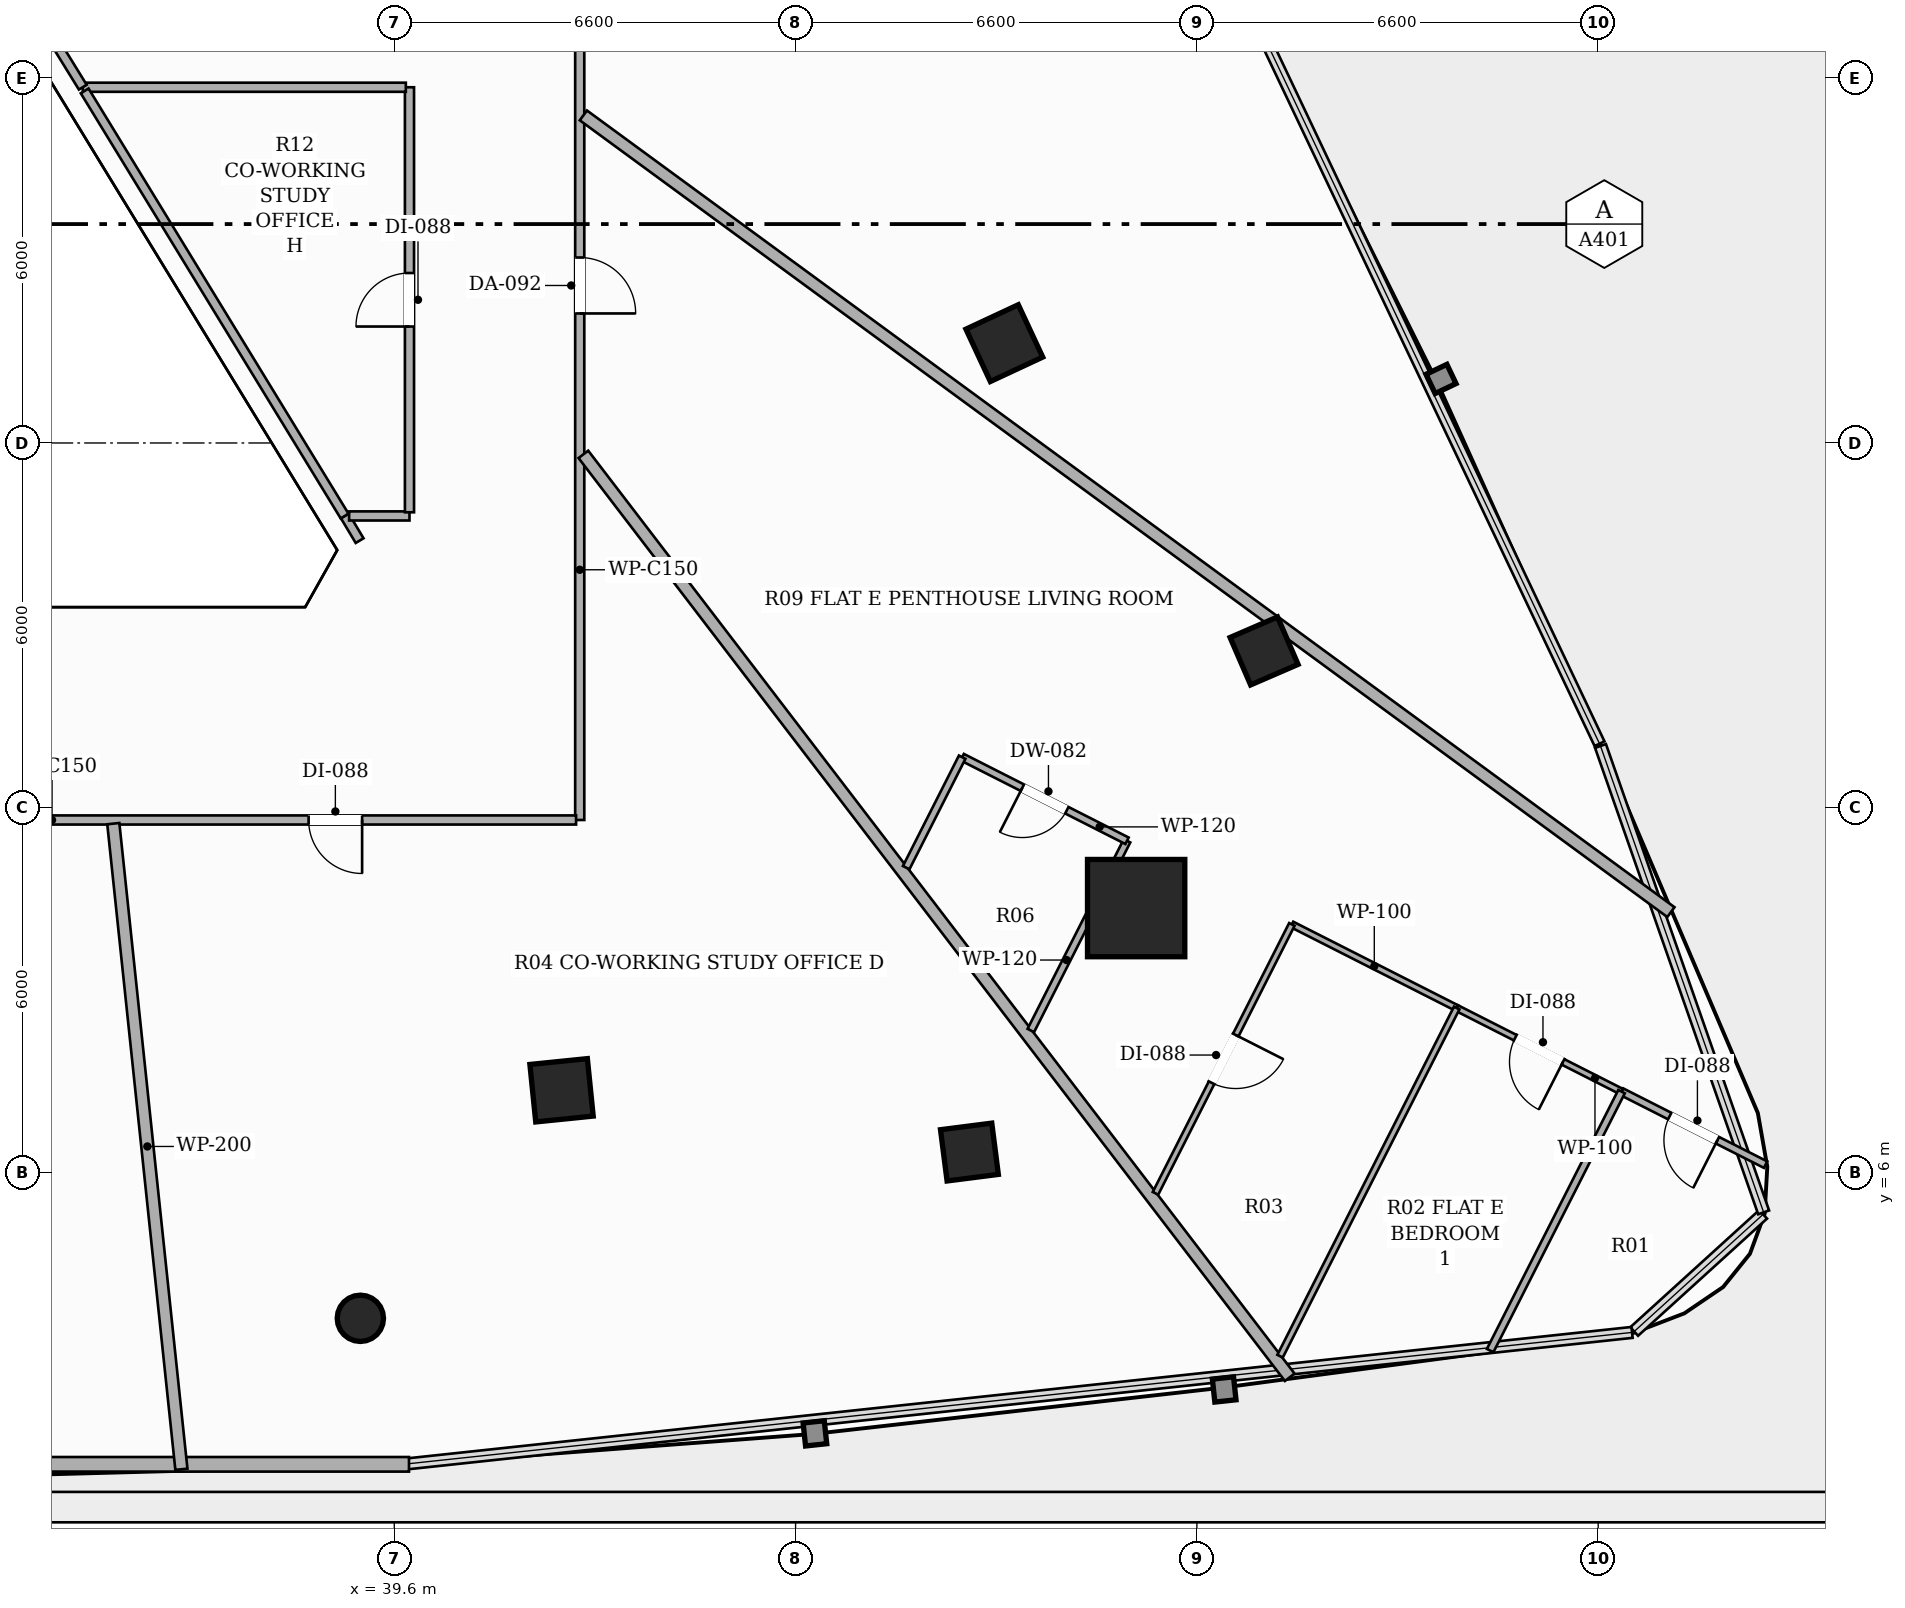
"""IFC4 building model, lengths in metres.
Left out: names, types, materials, properties, quantities, classifications, styles, units other than length and angle.
Written with IfcOpenShell. Run it as: python <this file> out.ifc"""

import sys

from ifc_helpers import new_model, si_unit, direction, frame, frame_2d, origin, origin_2d, place, context, subcontext, project, spatial, rectangle, hollow_rectangle, hollow_circle, extrude, element, fill, save


model = new_model("IFC4")
c1 = context("Model", 3, precision=1e-05, world=origin(), true_north=direction((0.0, 1.0)))
c2 = subcontext(c1, "Body", "Model", "MODEL_VIEW")
j1 = project(units=[si_unit("LENGTHUNIT", "METRE"), si_unit("PLANEANGLEUNIT", "RADIAN")], contexts=[c1])
p1 = place(None, origin())
s1 = spatial("IfcSite", under=j1, at=p1, CompositionType="ELEMENT")
p2 = place(p1, origin())
s2 = spatial("IfcBuilding", under=s1, at=p2, CompositionType="ELEMENT")
p3 = place(p2, frame((0.0, 0.0, 23.6)))
s3 = spatial("IfcBuildingStorey", under=s2, at=p3, CompositionType="ELEMENT", Elevation=23.6)
p4 = place(p3, frame((51.801, 10.351, 0.0), z_axis=(0.0, 0.0, 1.0), x_axis=(1.0, 0.0, 0.0)))
e1 = element("IfcColumn", 1, at=p4, inside=s3, PredefinedType="COLUMN", context=c2, shape_type="SweptSolid", body=[
    extrude(hollow_rectangle(XDim=1.6, YDim=1.6, WallThickness=0.05, at=origin_2d()), origin(), (0.0, 0.0, 1.0), 3.3),
])
for number, where, z_axis, x_axis in (
    (2, (42.351, 7.355, 0.0), (0.0, 0.0, 1.0), (0.995, 0.101, 0.0)),
    (3, (49.633, 19.642, 0.0), (0.0, 0.0, 1.0), (-0.423, 0.906, 0.0)),
):
    element("IfcColumn", number, at=place(p3, frame(where, z_axis=z_axis, x_axis=x_axis)), inside=s3, PredefinedType="COLUMN", context=c2, shape_type="SweptSolid", body=[
        extrude(hollow_rectangle(XDim=0.95, YDim=0.95, WallThickness=0.032, at=origin_2d()), origin(), (0.0, 0.0, 1.0), 3.3),
    ])
for number, where, z_axis, x_axis in (
    (4, (49.059, 6.339, 0.0), (0.0, 0.0, 1.0), (0.992, 0.127, 0.0)),
    (5, (53.905, 14.58, 0.0), (0.0, 0.0, 1.0), (-0.397, 0.918, 0.0)),
):
    element("IfcColumn", number, at=place(p3, frame(where, z_axis=z_axis, x_axis=x_axis)), inside=s3, PredefinedType="COLUMN", context=c2, shape_type="SweptSolid", body=[
        extrude(hollow_rectangle(XDim=0.85, YDim=0.85, WallThickness=0.028, at=origin_2d()), origin(), (0.0, 0.0, 1.0), 3.3),
    ])
p5 = place(p3, frame((39.042, 3.605, 0.0), z_axis=(0.0, 0.0, 1.0), x_axis=(1.0, 0.0, 0.0)))
e6 = element("IfcColumn", 6, at=p5, inside=s3, PredefinedType="COLUMN", context=c2, shape_type="SweptSolid", body=[
    extrude(hollow_circle(Radius=0.381, WallThickness=0.022, at=origin_2d()), origin(), (0.0, 0.0, 1.0), 3.3),
])
p6 = place(p3, frame((26.158, 1.204, 0.0), z_axis=(0.0, 0.0, 1.0), x_axis=(1.0, 0.0, 0.0)))
e7 = element("IfcWall", 7, at=p6, inside=s3, PredefinedType="SOLIDWALL", context=c2, shape_type="SweptSolid", body=[
    extrude(rectangle(XDim=13.684, YDim=0.24, at=frame_2d((6.842, 0.0))), origin(), (0.0, 0.0, 1.0), 2.624),
])
p7 = place(p6, frame((5.942, 0.0, 0.0)))
e8 = element("IfcOpeningElement", 8, at=p7, cuts=e7, PredefinedType="OPENING", context=c2, shape_type="SweptSolid", body=[
    extrude(rectangle(XDim=1.8, YDim=2.2, at=frame_2d((0.9, 1.1))), frame((0.0, 0.13, 0.0), z_axis=(0.0, -1.0, 0.0), x_axis=(1.0, 0.0, 0.0)), (0.0, 0.0, 1.0), 0.26),
])
p8 = place(p3, frame((42.65, 36.84, 0.0), z_axis=(0.0, 0.0, 1.0), x_axis=(0.0, -1.0, 0.0)))
e9 = element("IfcWall", 9, at=p8, inside=s3, PredefinedType="PARTITIONING", context=c2, shape_type="SweptSolid", body=[
    extrude(rectangle(XDim=25.04, YDim=0.15, at=frame_2d((12.52, 0.0))), origin(), (0.0, 0.0, 1.0), 2.413),
])
p9 = place(p8, frame((2.543, 0.0, 0.0)))
e10 = element("IfcOpeningElement", 10, at=p9, cuts=e9, PredefinedType="OPENING", context=c2, shape_type="SweptSolid", body=[
    extrude(rectangle(XDim=0.88, YDim=2.1, at=frame_2d((0.44, 1.05))), frame((0.0, 0.085, 0.0), z_axis=(0.0, -1.0, 0.0), x_axis=(1.0, 0.0, 0.0)), (0.0, 0.0, 1.0), 0.17),
])
p10 = place(p8, frame((15.79, 0.0, 0.0)))
e11 = element("IfcOpeningElement", 11, at=p10, cuts=e9, PredefinedType="OPENING", context=c2, shape_type="SweptSolid", body=[
    extrude(rectangle(XDim=0.92, YDim=2.15, at=frame_2d((0.46, 1.075))), frame((0.0, 0.085, 0.0), z_axis=(0.0, -1.0, 0.0), x_axis=(1.0, 0.0, 0.0)), (0.0, 0.0, 1.0), 0.17),
])
p11 = place(p8, frame((9.123, 0.0, 0.0)))
e12 = element("IfcOpeningElement", 12, at=p11, cuts=e9, PredefinedType="OPENING", context=c2, shape_type="SweptSolid", body=[
    extrude(rectangle(XDim=0.88, YDim=2.1, at=frame_2d((0.44, 1.05))), frame((0.0, 0.085, 0.0), z_axis=(0.0, -1.0, 0.0), x_axis=(1.0, 0.0, 0.0)), (0.0, 0.0, 1.0), 0.17),
])
p12 = place(p3, frame((42.59, 11.8, 0.0), z_axis=(0.0, 0.0, 1.0), x_axis=(-1.0, 0.0, 0.0)))
e13 = element("IfcWall", 13, at=p12, inside=s3, PredefinedType="PARTITIONING", context=c2, shape_type="SweptSolid", body=[
    extrude(rectangle(XDim=19.24, YDim=0.15, at=frame_2d((9.62, 0.0))), origin(), (0.0, 0.0, 1.0), 2.669),
])
p13 = place(p12, frame((12.838, 0.0, 0.0)))
e14 = element("IfcOpeningElement", 14, at=p13, cuts=e13, PredefinedType="OPENING", context=c2, shape_type="SweptSolid", body=[
    extrude(rectangle(XDim=0.88, YDim=2.1, at=frame_2d((0.44, 1.05))), frame((0.0, 0.085, 0.0), z_axis=(0.0, -1.0, 0.0), x_axis=(1.0, 0.0, 0.0)), (0.0, 0.0, 1.0), 0.17),
])
p14 = place(p12, frame((3.519, 0.0, 0.0)))
e15 = element("IfcOpeningElement", 15, at=p14, cuts=e13, PredefinedType="OPENING", context=c2, shape_type="SweptSolid", body=[
    extrude(rectangle(XDim=0.88, YDim=2.1, at=frame_2d((0.44, 1.05))), frame((0.0, 0.085, 0.0), z_axis=(0.0, -1.0, 0.0), x_axis=(1.0, 0.0, 0.0)), (0.0, 0.0, 1.0), 0.17),
])
p15 = place(p3, frame((39.03, 16.394, 0.0), z_axis=(0.0, 0.0, 1.0), x_axis=(-0.51343298076, 0.858129695482, 0.0)))
e16 = element("IfcWall", 16, at=p15, inside=s3, PredefinedType="PARTITIONING", context=c2, shape_type="SweptSolid", body=[
    extrude(rectangle(XDim=0.473, YDim=0.15, at=frame_2d((0.237, 0.0))), origin(), (0.0, 0.0, 1.0), 3.06),
])
p16 = place(p3, frame((38.857, 16.8, 0.0), z_axis=(0.0, 0.0, 1.0), x_axis=(1.0, 0.0, 0.0)))
e17 = element("IfcWall", 17, at=p16, inside=s3, PredefinedType="PARTITIONING", context=c2, shape_type="SweptSolid", body=[
    extrude(rectangle(XDim=0.993, YDim=0.15, at=frame_2d((0.497, 0.0))), origin(), (0.0, 0.0, 1.0), 3.06),
])
p17 = place(p3, frame((39.85, 16.86, 0.0), z_axis=(0.0, 0.0, 1.0), x_axis=(0.0, 1.0, 0.0)))
e18 = element("IfcWall", 18, at=p17, inside=s3, PredefinedType="PARTITIONING", context=c2, shape_type="SweptSolid", body=[
    extrude(rectangle(XDim=6.99, YDim=0.15, at=frame_2d((3.495, 0.0))), origin(), (0.0, 0.0, 1.0), 2.669),
])
p18 = place(p17, frame((3.055, 0.0, 0.0)))
e19 = element("IfcOpeningElement", 19, at=p18, cuts=e18, PredefinedType="OPENING", context=c2, shape_type="SweptSolid", body=[
    extrude(rectangle(XDim=0.88, YDim=2.1, at=frame_2d((0.44, 1.05))), frame((0.0, 0.085, 0.0), z_axis=(0.0, -1.0, 0.0), x_axis=(1.0, 0.0, 0.0)), (0.0, 0.0, 1.0), 0.17),
])
p19 = place(p3, frame((39.79, 23.85, 0.0), z_axis=(0.0, 0.0, 1.0), x_axis=(-1.0, 0.0, 0.0)))
e20 = element("IfcWall", 20, at=p19, inside=s3, PredefinedType="PARTITIONING", context=c2, shape_type="SweptSolid", body=[
    extrude(rectangle(XDim=5.313, YDim=0.15, at=frame_2d((2.656, 0.0))), origin(), (0.0, 0.0, 1.0), 2.669),
])
p20 = place(p3, frame((34.477, 23.851, 0.0), z_axis=(0.0, 0.0, 1.0), x_axis=(-0.52541513414, 0.8508460124, 0.0)))
e21 = element("IfcWall", 21, at=p20, inside=s3, PredefinedType="PARTITIONING", context=c2, shape_type="SweptSolid", body=[
    extrude(rectangle(XDim=1.136, YDim=0.15, at=frame_2d((0.568, 0.0))), origin(), (0.0, 0.0, 1.0), 3.06),
])
p21 = place(p3, frame((34.508, 23.79, 0.0), z_axis=(0.0, 0.0, 1.0), x_axis=(0.52163195406, -0.853170618636, 0.0)))
e22 = element("IfcWall", 22, at=p21, inside=s3, PredefinedType="PARTITIONING", context=c2, shape_type="SweptSolid", body=[
    extrude(rectangle(XDim=8.195, YDim=0.15, at=frame_2d((4.098, 0.0))), origin(), (0.0, 0.0, 1.0), 2.669),
])
p22 = place(p3, frame((34.979, 11.74, 0.0), z_axis=(0.0, 0.0, 1.0), x_axis=(0.104910939681, -0.994481621115, 0.0)))
e23 = element("IfcWall", 23, at=p22, inside=s3, PredefinedType="PARTITIONING", context=c2, shape_type="SweptSolid", body=[
    extrude(rectangle(XDim=10.677, YDim=0.2, at=frame_2d((5.338, 0.0))), origin(), (0.0, 0.0, 1.0), 2.413),
])
p23 = place(p3, frame((42.71, 17.813, 0.0), z_axis=(0.0, 0.0, 1.0), x_axis=(0.607788570878, -0.794098893784, 0.0)))
e24 = element("IfcWall", 24, at=p23, inside=s3, PredefinedType="PARTITIONING", context=c2, shape_type="SweptSolid", body=[
    extrude(rectangle(XDim=19.114, YDim=0.2, at=frame_2d((9.557, 0.0))), origin(), (0.0, 0.0, 1.0), 2.413),
])
p24 = place(p3, frame((42.71, 23.387, 0.0), z_axis=(0.0, 0.0, 1.0), x_axis=(0.806713303584, -0.590943014021, 0.0)))
e25 = element("IfcWall", 25, at=p24, inside=s3, PredefinedType="PARTITIONING", context=c2, shape_type="SweptSolid", body=[
    extrude(rectangle(XDim=22.171, YDim=0.2, at=frame_2d((11.086, 0.0))), origin(), (0.0, 0.0, 1.0), 2.413),
])
p25 = place(p3, frame((50.069, 8.338, 0.0), z_axis=(0.0, 0.0, 1.0), x_axis=(0.45217581214, 0.891928828391, 0.0)))
e26 = element("IfcWall", 26, at=p25, inside=s3, PredefinedType="PARTITIONING", context=c2, shape_type="SweptSolid", body=[
    extrude(rectangle(XDim=3.498, YDim=0.12, at=frame_2d((1.749, 0.0))), origin(), (0.0, 0.0, 1.0), 2.413),
])
p26 = place(p3, frame((51.651, 11.458, 0.0), z_axis=(0.0, 0.0, 1.0), x_axis=(-0.891842269509, 0.452346511336, 0.0)))
e27 = element("IfcWall", 27, at=p26, inside=s3, PredefinedType="PARTITIONING", context=c2, shape_type="SweptSolid", body=[
    extrude(rectangle(XDim=3.04, YDim=0.12, at=frame_2d((1.52, 0.0))), origin(), (0.0, 0.0, 1.0), 2.413),
])
p27 = place(p26, frame((1.11, 0.0, 0.0)))
e28 = element("IfcOpeningElement", 28, at=p27, cuts=e27, PredefinedType="OPENING", context=c2, shape_type="SweptSolid", body=[
    extrude(rectangle(XDim=0.82, YDim=2.1, at=frame_2d((0.41, 1.05))), frame((0.0, 0.07, 0.0), z_axis=(0.0, -1.0, 0.0), x_axis=(1.0, 0.0, 0.0)), (0.0, 0.0, 1.0), 0.14),
])
p28 = place(p3, frame((48.94, 12.833, 0.0), z_axis=(0.0, 0.0, 1.0), x_axis=(-0.452097038501, -0.891968759418, 0.0)))
e29 = element("IfcWall", 29, at=p28, inside=s3, PredefinedType="PARTITIONING", context=c2, shape_type="SweptSolid", body=[
    extrude(rectangle(XDim=2.037, YDim=0.12, at=frame_2d((1.019, 0.0))), origin(), (0.0, 0.0, 1.0), 3.06),
])
p29 = place(p3, frame((62.153, 6.132, 0.0), z_axis=(0.0, 0.0, 1.0), x_axis=(-0.891950280654, 0.452133494491, 0.0)))
e30 = element("IfcWall", 30, at=p29, inside=s3, PredefinedType="PARTITIONING", context=c2, shape_type="SweptSolid", body=[
    extrude(rectangle(XDim=2.656, YDim=0.12, at=frame_2d((1.328, 0.0))), origin(), (0.0, 0.0, 1.0), 3.06),
])
p30 = place(p29, frame((0.888, 0.0, 0.0)))
e31 = element("IfcOpeningElement", 31, at=p30, cuts=e30, PredefinedType="OPENING", context=c2, shape_type="SweptSolid", body=[
    extrude(rectangle(XDim=0.88, YDim=2.1, at=frame_2d((0.44, 1.05))), frame((0.0, 0.07, 0.0), z_axis=(0.0, -1.0, 0.0), x_axis=(1.0, 0.0, 0.0)), (0.0, 0.0, 1.0), 0.14),
])
p31 = place(p3, frame((59.784, 7.333, 0.0), z_axis=(0.0, 0.0, 1.0), x_axis=(-0.891842269509, 0.452346511336, 0.0)))
e32 = element("IfcWall", 32, at=p31, inside=s3, PredefinedType="PARTITIONING", context=c2, shape_type="SweptSolid", body=[
    extrude(rectangle(XDim=3.04, YDim=0.1, at=frame_2d((1.52, 0.0))), origin(), (0.0, 0.0, 1.0), 3.06),
])
p32 = place(p31, frame((1.08, 0.0, 0.0)))
e33 = element("IfcOpeningElement", 33, at=p32, cuts=e32, PredefinedType="OPENING", context=c2, shape_type="SweptSolid", body=[
    extrude(rectangle(XDim=0.88, YDim=2.1, at=frame_2d((0.44, 1.05))), frame((0.0, 0.06, 0.0), z_axis=(0.0, -1.0, 0.0), x_axis=(1.0, 0.0, 0.0)), (0.0, 0.0, 1.0), 0.12),
])
p33 = place(p3, frame((57.073, 8.708, 0.0), z_axis=(0.0, 0.0, 1.0), x_axis=(-0.891842269509, 0.452346511336, 0.0)))
e34 = element("IfcWall", 34, at=p33, inside=s3, PredefinedType="PARTITIONING", context=c2, shape_type="SweptSolid", body=[
    extrude(rectangle(XDim=3.04, YDim=0.1, at=frame_2d((1.52, 0.0))), origin(), (0.0, 0.0, 1.0), 2.619),
])
p34 = place(p3, frame((54.362, 10.083, 0.0), z_axis=(0.0, 0.0, 1.0), x_axis=(-0.452306340277, -0.891862643317, 0.0)))
e35 = element("IfcWall", 35, at=p34, inside=s3, PredefinedType="PARTITIONING", context=c2, shape_type="SweptSolid", body=[
    extrude(rectangle(XDim=4.959, YDim=0.1, at=frame_2d((2.48, 0.0))), origin(), (0.0, 0.0, 1.0), 3.06),
])
p35 = place(p34, frame((2.04, 0.0, 0.0)))
e36 = element("IfcOpeningElement", 36, at=p35, cuts=e35, PredefinedType="OPENING", context=c2, shape_type="SweptSolid", body=[
    extrude(rectangle(XDim=0.88, YDim=2.1, at=frame_2d((0.44, 1.05))), frame((0.0, 0.06, 0.0), z_axis=(0.0, -1.0, 0.0), x_axis=(1.0, 0.0, 0.0)), (0.0, 0.0, 1.0), 0.12),
])
p36 = place(p3, frame((57.623, 3.074, 0.0), z_axis=(0.0, 0.0, 1.0), x_axis=(0.452460987707, 0.891784197328, 0.0)))
e37 = element("IfcWall", 37, at=p36, inside=s3, PredefinedType="PARTITIONING", context=c2, shape_type="SweptSolid", body=[
    extrude(rectangle(XDim=4.776, YDim=0.12, at=frame_2d((2.388, 0.0))), origin(), (0.0, 0.0, 1.0), 3.06),
])
p37 = place(p3, frame((54.168, 2.982, 0.0), z_axis=(0.0, 0.0, 1.0), x_axis=(0.452437935158, 0.891795893033, 0.0)))
e38 = element("IfcWall", 38, at=p37, inside=s3, PredefinedType="PARTITIONING", context=c2, shape_type="SweptSolid", body=[
    extrude(rectangle(XDim=6.421, YDim=0.1, at=frame_2d((3.21, 0.0))), origin(), (0.0, 0.0, 1.0), 2.619),
])
p38 = place(p14, origin())
e39 = element("IfcDoor", 39, at=p38, inside=s3, OperationType="SINGLE_SWING_LEFT", PredefinedType="DOOR", context=c2, shape_type="SweptSolid", body=[
    extrude(rectangle(XDim=0.88, YDim=2.1, at=frame_2d((0.44, 1.05))), frame((0.0, 0.025, 0.0), z_axis=(0.0, -1.0, 0.0), x_axis=(1.0, 0.0, 0.0)), (0.0, 0.0, 1.0), 0.05),
])
fill(e15, e39)
p39 = place(p10, origin())
e40 = element("IfcDoor", 40, at=p39, inside=s3, OperationType="SINGLE_SWING_RIGHT", PredefinedType="DOOR", context=c2, shape_type="SweptSolid", body=[
    extrude(rectangle(XDim=0.92, YDim=2.15, at=frame_2d((0.46, 1.075))), frame((0.0, 0.025, 0.0), z_axis=(0.0, -1.0, 0.0), x_axis=(1.0, 0.0, 0.0)), (0.0, 0.0, 1.0), 0.05),
])
fill(e11, e40)
p40 = place(p27, origin())
e41 = element("IfcDoor", 41, at=p40, inside=s3, OperationType="SINGLE_SWING_RIGHT", PredefinedType="DOOR", context=c2, shape_type="SweptSolid", body=[
    extrude(rectangle(XDim=0.82, YDim=2.1, at=frame_2d((0.41, 1.05))), frame((0.0, 0.025, 0.0), z_axis=(0.0, -1.0, 0.0), x_axis=(1.0, 0.0, 0.0)), (0.0, 0.0, 1.0), 0.05),
])
fill(e28, e41)
p41 = place(p30, origin())
e42 = element("IfcDoor", 42, at=p41, inside=s3, OperationType="SINGLE_SWING_LEFT", PredefinedType="DOOR", context=c2, shape_type="SweptSolid", body=[
    extrude(rectangle(XDim=0.88, YDim=2.1, at=frame_2d((0.44, 1.05))), frame((0.0, 0.025, 0.0), z_axis=(0.0, -1.0, 0.0), x_axis=(1.0, 0.0, 0.0)), (0.0, 0.0, 1.0), 0.05),
])
fill(e31, e42)
p42 = place(p32, origin())
e43 = element("IfcDoor", 43, at=p42, inside=s3, OperationType="SINGLE_SWING_LEFT", PredefinedType="DOOR", context=c2, shape_type="SweptSolid", body=[
    extrude(rectangle(XDim=0.88, YDim=2.1, at=frame_2d((0.44, 1.05))), frame((0.0, 0.025, 0.0), z_axis=(0.0, -1.0, 0.0), x_axis=(1.0, 0.0, 0.0)), (0.0, 0.0, 1.0), 0.05),
])
fill(e33, e43)
p43 = place(p35, origin())
e44 = element("IfcDoor", 44, at=p43, inside=s3, OperationType="SINGLE_SWING_LEFT", PredefinedType="DOOR", context=c2, shape_type="SweptSolid", body=[
    extrude(rectangle(XDim=0.88, YDim=2.1, at=frame_2d((0.44, 1.05))), frame((0.0, 0.025, 0.0), z_axis=(0.0, -1.0, 0.0), x_axis=(1.0, 0.0, 0.0)), (0.0, 0.0, 1.0), 0.05),
])
fill(e36, e44)
p44 = place(p18, origin())
e45 = element("IfcDoor", 45, at=p44, inside=s3, OperationType="SINGLE_SWING_LEFT", PredefinedType="DOOR", context=c2, shape_type="SweptSolid", body=[
    extrude(rectangle(XDim=0.88, YDim=2.1, at=frame_2d((0.44, 1.05))), frame((0.0, 0.025, 0.0), z_axis=(0.0, -1.0, 0.0), x_axis=(1.0, 0.0, 0.0)), (0.0, 0.0, 1.0), 0.05),
])
fill(e19, e45)
save(model, sys.argv[1])
